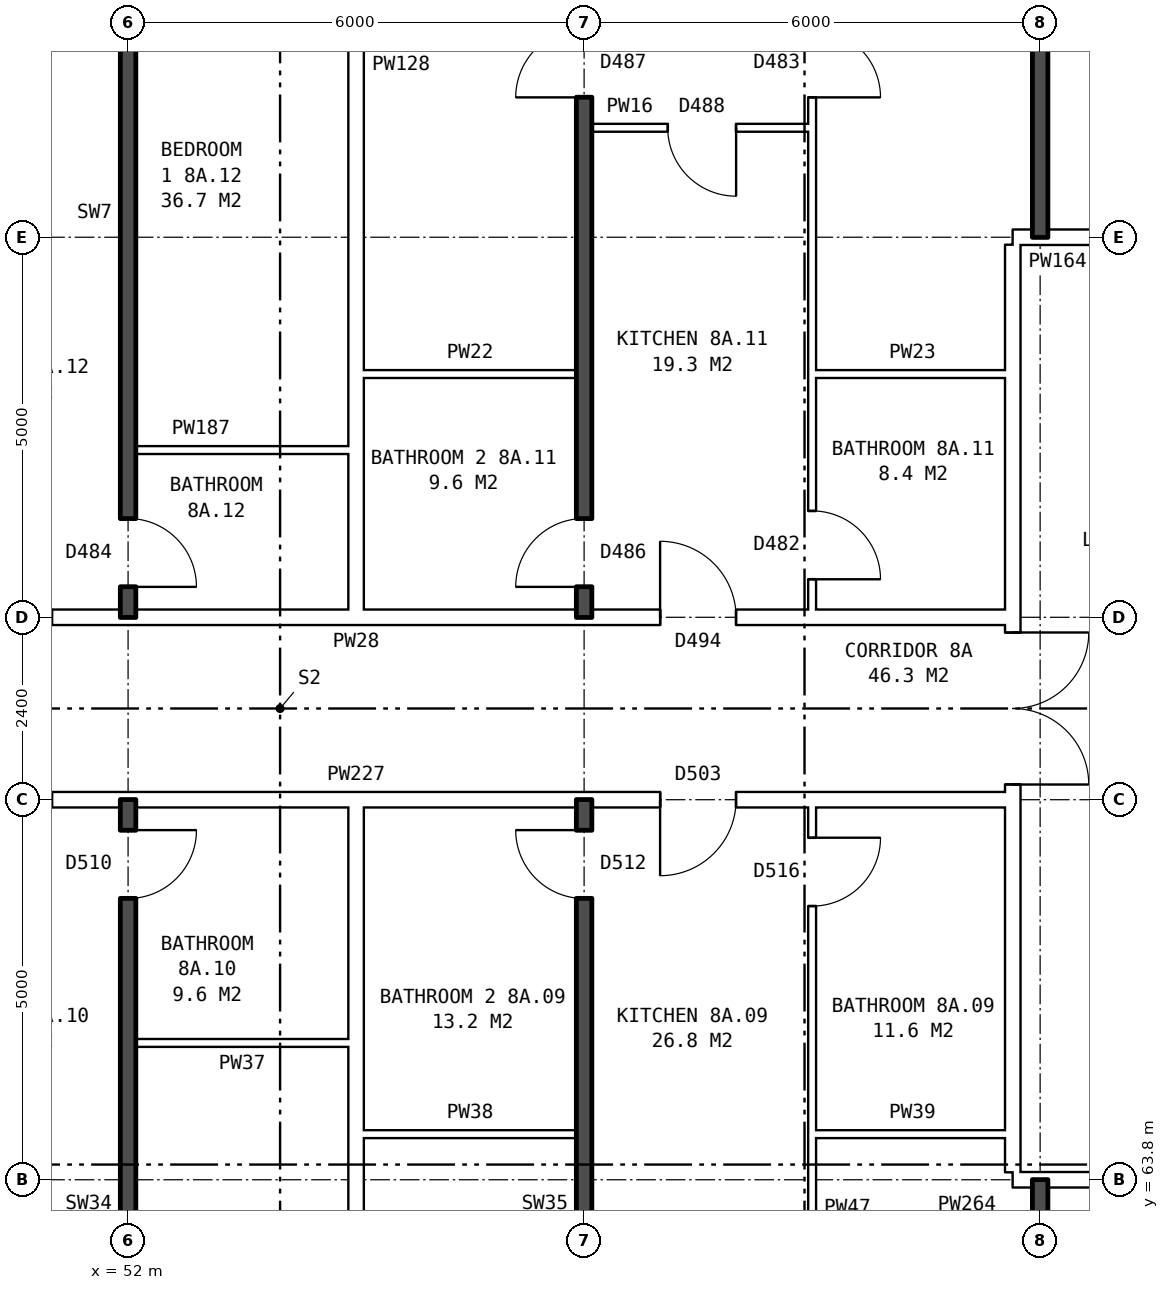
"""IFC4 building model, lengths in metres.
Left out: names, types, materials, properties, quantities, classifications, styles, units other than length and angle.
Written with IfcOpenShell. Run it as: python <this file> out.ifc"""

import sys

from ifc_helpers import new_model, si_unit, direction, frame, frame_2d, origin, place, context, subcontext, project, spatial, rectangle, extrude, element, fill, save


model = new_model("IFC4")
c1 = context("Model", 3, precision=1e-05, world=origin(), true_north=direction((0.0, 1.0)))
c2 = subcontext(c1, "Body", "Model", "MODEL_VIEW")
j1 = project(units=[si_unit("LENGTHUNIT", "METRE"), si_unit("PLANEANGLEUNIT", "RADIAN")], contexts=[c1])
p1 = place(None, origin())
s1 = spatial("IfcSite", under=j1, at=p1, CompositionType="ELEMENT")
p2 = place(p1, origin())
s2 = spatial("IfcBuilding", under=s1, at=p2, CompositionType="ELEMENT")
p3 = place(p2, frame((0.0, 0.0, 31.9)))
s3 = spatial("IfcBuildingStorey", under=s2, at=p3, CompositionType="ELEMENT", Elevation=31.9)
p4 = place(p3, frame((63.64, 63.9, 0.0), z_axis=(0.0, 0.0, 1.0), x_axis=(0.0, 1.0, 0.0)))
e1 = element("IfcWall", 1, at=p4, inside=s3, PredefinedType="PARTITIONING", context=c2, shape_type="SweptSolid", body=[
    extrude(rectangle(XDim=12.2, YDim=0.2, at=frame_2d((6.1, 0.0))), origin(), (0.0, 0.0, 1.0), 2.85),
])
p5 = place(p4, frame((5.1, 0.0, 0.0)))
e2 = element("IfcOpeningElement", 2, at=p5, cuts=e1, PredefinedType="OPENING", context=c2, shape_type="SweptSolid", body=[
    extrude(rectangle(XDim=2.0, YDim=2.1, at=frame_2d((1.0, 1.05))), frame((0.0, 0.11, 0.0), z_axis=(0.0, -1.0, 0.0), x_axis=(1.0, 0.0, 0.0)), (0.0, 0.0, 1.0), 0.22),
])
p6 = place(p3, frame((63.64, 63.8, 0.0), z_axis=(0.0, 0.0, 1.0), x_axis=(1.0, 0.0, 0.0)))
e3 = element("IfcWall", 3, at=p6, inside=s3, PredefinedType="PARTITIONING", context=c2, shape_type="SweptSolid", body=[
    extrude(rectangle(XDim=3.0, YDim=0.2, at=frame_2d((1.5, 0.0))), origin(), (0.0, 0.0, 1.0), 2.85),
])
p7 = place(p6, frame((1.18, 0.0, 0.0)))
e4 = element("IfcOpeningElement", 4, at=p7, cuts=e3, PredefinedType="OPENING", context=c2, shape_type="SweptSolid", body=[
    extrude(rectangle(XDim=1.0, YDim=2.1, at=frame_2d((0.5, 1.05))), frame((0.0, 0.11, 0.0), z_axis=(0.0, -1.0, 0.0), x_axis=(1.0, 0.0, 0.0)), (0.0, 0.0, 1.0), 0.22),
])
p8 = place(p3, frame((55.1, 64.4, 0.0), z_axis=(0.0, 0.0, 1.0), x_axis=(1.0, 0.0, 0.0)))
e5 = element("IfcWall", 5, at=p8, inside=s3, PredefinedType="PARTITIONING", context=c2, shape_type="SweptSolid", body=[
    extrude(rectangle(XDim=2.8, YDim=0.1, at=frame_2d((1.4, 0.0))), origin(), (0.0, 0.0, 1.0), 2.85),
])
p9 = place(p3, frame((61.0, 64.4, 0.0), z_axis=(0.0, 0.0, 1.0), x_axis=(1.0, 0.0, 0.0)))
e6 = element("IfcWall", 6, at=p9, inside=s3, PredefinedType="PARTITIONING", context=c2, shape_type="SweptSolid", body=[
    extrude(rectangle(XDim=2.64, YDim=0.1, at=frame_2d((1.32, 0.0))), origin(), (0.0, 0.0, 1.0), 2.85),
])
p10 = place(p3, frame((52.1, 65.6, 0.0), z_axis=(0.0, 0.0, 1.0), x_axis=(1.0, 0.0, 0.0)))
e7 = element("IfcWall", 7, at=p10, inside=s3, PredefinedType="PARTITIONING", context=c2, shape_type="SweptSolid", body=[
    extrude(rectangle(XDim=2.8, YDim=0.1, at=frame_2d((1.4, 0.0))), origin(), (0.0, 0.0, 1.0), 2.85),
])
p11 = place(p3, frame((44.36, 68.8, 0.0), z_axis=(0.0, 0.0, 1.0), x_axis=(1.0, 0.0, 0.0)))
e8 = element("IfcWall", 8, at=p11, inside=s3, PredefinedType="PARTITIONING", context=c2, shape_type="SweptSolid", body=[
    extrude(rectangle(XDim=19.28, YDim=0.2, at=frame_2d((9.64, 0.0))), origin(), (0.0, 0.0, 1.0), 2.85),
])
p12 = place(p11, frame((14.64, 0.0, 0.0)))
e9 = element("IfcOpeningElement", 9, at=p12, cuts=e8, PredefinedType="OPENING", context=c2, shape_type="SweptSolid", body=[
    extrude(rectangle(XDim=1.0, YDim=2.1, at=frame_2d((0.5, 1.05))), frame((0.0, 0.11, 0.0), z_axis=(0.0, -1.0, 0.0), x_axis=(1.0, 0.0, 0.0)), (0.0, 0.0, 1.0), 0.22),
])
p13 = place(p11, frame((5.64, 0.0, 0.0)))
e10 = element("IfcOpeningElement", 10, at=p13, cuts=e8, PredefinedType="OPENING", context=c2, shape_type="SweptSolid", body=[
    extrude(rectangle(XDim=1.0, YDim=2.1, at=frame_2d((0.5, 1.05))), frame((0.0, 0.11, 0.0), z_axis=(0.0, -1.0, 0.0), x_axis=(1.0, 0.0, 0.0)), (0.0, 0.0, 1.0), 0.22),
])
p14 = place(p3, frame((44.36, 71.2, 0.0), z_axis=(0.0, 0.0, 1.0), x_axis=(1.0, 0.0, 0.0)))
e11 = element("IfcWall", 11, at=p14, inside=s3, PredefinedType="PARTITIONING", context=c2, shape_type="SweptSolid", body=[
    extrude(rectangle(XDim=19.28, YDim=0.2, at=frame_2d((9.64, 0.0))), origin(), (0.0, 0.0, 1.0), 2.85),
])
p15 = place(p14, frame((14.64, 0.0, 0.0)))
e12 = element("IfcOpeningElement", 12, at=p15, cuts=e11, PredefinedType="OPENING", context=c2, shape_type="SweptSolid", body=[
    extrude(rectangle(XDim=1.0, YDim=2.1, at=frame_2d((0.5, 1.05))), frame((0.0, 0.11, 0.0), z_axis=(0.0, -1.0, 0.0), x_axis=(1.0, 0.0, 0.0)), (0.0, 0.0, 1.0), 0.22),
])
p16 = place(p14, frame((5.64, 0.0, 0.0)))
e13 = element("IfcOpeningElement", 13, at=p16, cuts=e11, PredefinedType="OPENING", context=c2, shape_type="SweptSolid", body=[
    extrude(rectangle(XDim=1.0, YDim=2.1, at=frame_2d((0.5, 1.05))), frame((0.0, 0.11, 0.0), z_axis=(0.0, -1.0, 0.0), x_axis=(1.0, 0.0, 0.0)), (0.0, 0.0, 1.0), 0.22),
])
for number, where, z_axis, x_axis in (
    (14, (52.1, 73.4, 0.0), (0.0, 0.0, 1.0), (1.0, 0.0, 0.0)),
    (15, (55.1, 74.4, 0.0), (0.0, 0.0, 1.0), (1.0, 0.0, 0.0)),
):
    element("IfcWall", number, at=place(p3, frame(where, z_axis=z_axis, x_axis=x_axis)), inside=s3, PredefinedType="PARTITIONING", context=c2, shape_type="SweptSolid", body=[
        extrude(rectangle(XDim=2.8, YDim=0.1, at=frame_2d((1.4, 0.0))), origin(), (0.0, 0.0, 1.0), 2.85),
    ])
p17 = place(p3, frame((61.0, 74.4, 0.0), z_axis=(0.0, 0.0, 1.0), x_axis=(1.0, 0.0, 0.0)))
e16 = element("IfcWall", 16, at=p17, inside=s3, PredefinedType="PARTITIONING", context=c2, shape_type="SweptSolid", body=[
    extrude(rectangle(XDim=2.64, YDim=0.1, at=frame_2d((1.32, 0.0))), origin(), (0.0, 0.0, 1.0), 2.85),
])
p18 = place(p3, frame((63.64, 76.2, 0.0), z_axis=(0.0, 0.0, 1.0), x_axis=(1.0, 0.0, 0.0)))
e17 = element("IfcWall", 17, at=p18, inside=s3, PredefinedType="PARTITIONING", context=c2, shape_type="SweptSolid", body=[
    extrude(rectangle(XDim=3.0, YDim=0.2, at=frame_2d((1.5, 0.0))), origin(), (0.0, 0.0, 1.0), 2.85),
])
p19 = place(p18, frame((1.18, 0.0, 0.0)))
e18 = element("IfcOpeningElement", 18, at=p19, cuts=e17, PredefinedType="OPENING", context=c2, shape_type="SweptSolid", body=[
    extrude(rectangle(XDim=1.0, YDim=2.1, at=frame_2d((0.5, 1.05))), frame((0.0, 0.11, 0.0), z_axis=(0.0, -1.0, 0.0), x_axis=(1.0, 0.0, 0.0)), (0.0, 0.0, 1.0), 0.22),
])
p20 = place(p3, frame((58.1, 77.64, 0.0), z_axis=(0.0, 0.0, 1.0), x_axis=(1.0, 0.0, 0.0)))
e19 = element("IfcWall", 19, at=p20, inside=s3, PredefinedType="PARTITIONING", context=c2, shape_type="SweptSolid", body=[
    extrude(rectangle(XDim=2.9, YDim=0.1, at=frame_2d((1.45, 0.0))), origin(), (0.0, 0.0, 1.0), 2.85),
])
p21 = place(p20, frame((1.0, 0.0, 0.0)))
e20 = element("IfcOpeningElement", 20, at=p21, cuts=e19, PredefinedType="OPENING", context=c2, shape_type="SweptSolid", body=[
    extrude(rectangle(XDim=0.9, YDim=2.1, at=frame_2d((0.45, 1.05))), frame((0.0, 0.06, 0.0), z_axis=(0.0, -1.0, 0.0), x_axis=(1.0, 0.0, 0.0)), (0.0, 0.0, 1.0), 0.12),
])
p22 = place(p3, frame((52.0, 54.36, 0.0), z_axis=(0.0, 0.0, 1.0), x_axis=(0.0, 1.0, 0.0)))
e21 = element("IfcWall", 21, at=p22, inside=s3, PredefinedType="SOLIDWALL", context=c2, shape_type="SweptSolid", body=[
    extrude(rectangle(XDim=14.44, YDim=0.2, at=frame_2d((7.22, 0.0))), origin(), (0.0, 0.0, 1.0), 2.85),
])
p23 = place(p22, frame((4.2, 0.0, 0.0)))
e22 = element("IfcOpeningElement", 22, at=p23, cuts=e21, PredefinedType="OPENING", context=c2, shape_type="SweptSolid", body=[
    extrude(rectangle(XDim=0.9, YDim=2.1, at=frame_2d((0.45, 1.05))), frame((0.0, 0.11, 0.0), z_axis=(0.0, -1.0, 0.0), x_axis=(1.0, 0.0, 0.0)), (0.0, 0.0, 1.0), 0.22),
])
p24 = place(p22, frame((13.14, 0.0, 0.0)))
e23 = element("IfcOpeningElement", 23, at=p24, cuts=e21, PredefinedType="OPENING", context=c2, shape_type="SweptSolid", body=[
    extrude(rectangle(XDim=0.9, YDim=2.1, at=frame_2d((0.45, 1.05))), frame((0.0, 0.11, 0.0), z_axis=(0.0, -1.0, 0.0), x_axis=(1.0, 0.0, 0.0)), (0.0, 0.0, 1.0), 0.22),
])
p25 = place(p3, frame((52.0, 71.2, 0.0), z_axis=(0.0, 0.0, 1.0), x_axis=(0.0, 1.0, 0.0)))
e24 = element("IfcWall", 24, at=p25, inside=s3, PredefinedType="SOLIDWALL", context=c2, shape_type="SweptSolid", body=[
    extrude(rectangle(XDim=14.44, YDim=0.2, at=frame_2d((7.22, 0.0))), origin(), (0.0, 0.0, 1.0), 2.85),
])
p26 = place(p25, frame((9.34, 0.0, 0.0)))
e25 = element("IfcOpeningElement", 25, at=p26, cuts=e24, PredefinedType="OPENING", context=c2, shape_type="SweptSolid", body=[
    extrude(rectangle(XDim=0.9, YDim=2.1, at=frame_2d((0.45, 1.05))), frame((0.0, 0.11, 0.0), z_axis=(0.0, -1.0, 0.0), x_axis=(1.0, 0.0, 0.0)), (0.0, 0.0, 1.0), 0.22),
])
p27 = place(p25, frame((0.4, 0.0, 0.0)))
e26 = element("IfcOpeningElement", 26, at=p27, cuts=e24, PredefinedType="OPENING", context=c2, shape_type="SweptSolid", body=[
    extrude(rectangle(XDim=0.9, YDim=2.1, at=frame_2d((0.45, 1.05))), frame((0.0, 0.11, 0.0), z_axis=(0.0, -1.0, 0.0), x_axis=(1.0, 0.0, 0.0)), (0.0, 0.0, 1.0), 0.22),
])
for number, where, z_axis, x_axis in (
    (27, (55.0, 54.36, 0.0), (0.0, 0.0, 1.0), (0.0, 1.0, 0.0)),
    (28, (55.0, 71.3, 0.0), (0.0, 0.0, 1.0), (0.0, 1.0, 0.0)),
):
    element("IfcWall", number, at=place(p3, frame(where, z_axis=z_axis, x_axis=x_axis)), inside=s3, PredefinedType="PARTITIONING", context=c2, shape_type="SweptSolid", body=[
        extrude(rectangle(XDim=14.34, YDim=0.2, at=frame_2d((7.17, 0.0))), origin(), (0.0, 0.0, 1.0), 2.85),
    ])
p28 = place(p3, frame((58.0, 54.36, 0.0), z_axis=(0.0, 0.0, 1.0), x_axis=(0.0, 1.0, 0.0)))
e29 = element("IfcWall", 29, at=p28, inside=s3, PredefinedType="SOLIDWALL", context=c2, shape_type="SweptSolid", body=[
    extrude(rectangle(XDim=14.44, YDim=0.2, at=frame_2d((7.22, 0.0))), origin(), (0.0, 0.0, 1.0), 2.85),
])
p29 = place(p28, frame((4.2, 0.0, 0.0)))
e30 = element("IfcOpeningElement", 30, at=p29, cuts=e29, PredefinedType="OPENING", context=c2, shape_type="SweptSolid", body=[
    extrude(rectangle(XDim=0.9, YDim=2.1, at=frame_2d((0.45, 1.05))), frame((0.0, 0.11, 0.0), z_axis=(0.0, -1.0, 0.0), x_axis=(1.0, 0.0, 0.0)), (0.0, 0.0, 1.0), 0.22),
])
p30 = place(p28, frame((13.14, 0.0, 0.0)))
e31 = element("IfcOpeningElement", 31, at=p30, cuts=e29, PredefinedType="OPENING", context=c2, shape_type="SweptSolid", body=[
    extrude(rectangle(XDim=0.9, YDim=2.1, at=frame_2d((0.45, 1.05))), frame((0.0, 0.11, 0.0), z_axis=(0.0, -1.0, 0.0), x_axis=(1.0, 0.0, 0.0)), (0.0, 0.0, 1.0), 0.22),
])
p31 = place(p3, frame((58.0, 71.2, 0.0), z_axis=(0.0, 0.0, 1.0), x_axis=(0.0, 1.0, 0.0)))
e32 = element("IfcWall", 32, at=p31, inside=s3, PredefinedType="SOLIDWALL", context=c2, shape_type="SweptSolid", body=[
    extrude(rectangle(XDim=14.44, YDim=0.2, at=frame_2d((7.22, 0.0))), origin(), (0.0, 0.0, 1.0), 2.85),
])
p32 = place(p31, frame((6.84, 0.0, 0.0)))
e33 = element("IfcOpeningElement", 33, at=p32, cuts=e32, PredefinedType="OPENING", context=c2, shape_type="SweptSolid", body=[
    extrude(rectangle(XDim=0.9, YDim=2.1, at=frame_2d((0.45, 1.05))), frame((0.0, 0.11, 0.0), z_axis=(0.0, -1.0, 0.0), x_axis=(1.0, 0.0, 0.0)), (0.0, 0.0, 1.0), 0.22),
])
p33 = place(p31, frame((0.4, 0.0, 0.0)))
e34 = element("IfcOpeningElement", 34, at=p33, cuts=e32, PredefinedType="OPENING", context=c2, shape_type="SweptSolid", body=[
    extrude(rectangle(XDim=0.9, YDim=2.1, at=frame_2d((0.45, 1.05))), frame((0.0, 0.11, 0.0), z_axis=(0.0, -1.0, 0.0), x_axis=(1.0, 0.0, 0.0)), (0.0, 0.0, 1.0), 0.22),
])
p34 = place(p3, frame((61.0, 54.36, 0.0), z_axis=(0.0, 0.0, 1.0), x_axis=(0.0, 1.0, 0.0)))
e35 = element("IfcWall", 35, at=p34, inside=s3, PredefinedType="PARTITIONING", context=c2, shape_type="SweptSolid", body=[
    extrude(rectangle(XDim=14.34, YDim=0.1, at=frame_2d((7.17, 0.0))), origin(), (0.0, 0.0, 1.0), 2.85),
])
p35 = place(p34, frame((4.2, 0.0, 0.0)))
e36 = element("IfcOpeningElement", 36, at=p35, cuts=e35, PredefinedType="OPENING", context=c2, shape_type="SweptSolid", body=[
    extrude(rectangle(XDim=0.9, YDim=2.1, at=frame_2d((0.45, 1.05))), frame((0.0, 0.06, 0.0), z_axis=(0.0, -1.0, 0.0), x_axis=(1.0, 0.0, 0.0)), (0.0, 0.0, 1.0), 0.12),
])
p36 = place(p34, frame((13.04, 0.0, 0.0)))
e37 = element("IfcOpeningElement", 37, at=p36, cuts=e35, PredefinedType="OPENING", context=c2, shape_type="SweptSolid", body=[
    extrude(rectangle(XDim=0.9, YDim=2.1, at=frame_2d((0.45, 1.05))), frame((0.0, 0.06, 0.0), z_axis=(0.0, -1.0, 0.0), x_axis=(1.0, 0.0, 0.0)), (0.0, 0.0, 1.0), 0.12),
])
p37 = place(p3, frame((61.0, 71.3, 0.0), z_axis=(0.0, 0.0, 1.0), x_axis=(0.0, 1.0, 0.0)))
e38 = element("IfcWall", 38, at=p37, inside=s3, PredefinedType="PARTITIONING", context=c2, shape_type="SweptSolid", body=[
    extrude(rectangle(XDim=14.34, YDim=0.1, at=frame_2d((7.17, 0.0))), origin(), (0.0, 0.0, 1.0), 2.85),
])
p38 = place(p37, frame((6.74, 0.0, 0.0)))
e39 = element("IfcOpeningElement", 39, at=p38, cuts=e38, PredefinedType="OPENING", context=c2, shape_type="SweptSolid", body=[
    extrude(rectangle(XDim=0.9, YDim=2.1, at=frame_2d((0.45, 1.05))), frame((0.0, 0.06, 0.0), z_axis=(0.0, -1.0, 0.0), x_axis=(1.0, 0.0, 0.0)), (0.0, 0.0, 1.0), 0.12),
])
p39 = place(p37, frame((0.4, 0.0, 0.0)))
e40 = element("IfcOpeningElement", 40, at=p39, cuts=e38, PredefinedType="OPENING", context=c2, shape_type="SweptSolid", body=[
    extrude(rectangle(XDim=0.9, YDim=2.1, at=frame_2d((0.45, 1.05))), frame((0.0, 0.06, 0.0), z_axis=(0.0, -1.0, 0.0), x_axis=(1.0, 0.0, 0.0)), (0.0, 0.0, 1.0), 0.12),
])
for number, where, z_axis, x_axis in (
    (41, (64.0, 54.36, 0.0), (0.0, 0.0, 1.0), (0.0, 1.0, 0.0)),
    (42, (64.0, 76.2, 0.0), (0.0, 0.0, 1.0), (0.0, 1.0, 0.0)),
):
    element("IfcWall", number, at=place(p3, frame(where, z_axis=z_axis, x_axis=x_axis)), inside=s3, PredefinedType="SOLIDWALL", context=c2, shape_type="SweptSolid", body=[
        extrude(rectangle(XDim=9.44, YDim=0.2, at=frame_2d((4.72, 0.0))), origin(), (0.0, 0.0, 1.0), 2.85),
    ])
p40 = place(p5, frame((2.0, 0.0, 0.0), z_axis=(0.0, 0.0, 1.0), x_axis=(-1.0, 0.0, 0.0)))
e43 = element("IfcDoor", 43, at=p40, inside=s3, OperationType="DOUBLE_DOOR_SINGLE_SWING", PredefinedType="DOOR", context=c2, shape_type="SweptSolid", body=[
    extrude(rectangle(XDim=2.0, YDim=2.1, at=frame_2d((1.0, 1.05))), frame((0.0, 0.025, 0.0), z_axis=(0.0, -1.0, 0.0), x_axis=(1.0, 0.0, 0.0)), (0.0, 0.0, 1.0), 0.05),
])
fill(e2, e43)
p41 = place(p12, frame((1.0, 0.0, 0.0), z_axis=(0.0, 0.0, 1.0), x_axis=(-1.0, 0.0, 0.0)))
e44 = element("IfcDoor", 44, at=p41, inside=s3, OperationType="SINGLE_SWING_RIGHT", PredefinedType="DOOR", context=c2, shape_type="SweptSolid", body=[
    extrude(rectangle(XDim=1.0, YDim=2.1, at=frame_2d((0.5, 1.05))), frame((0.0, 0.025, 0.0), z_axis=(0.0, -1.0, 0.0), x_axis=(1.0, 0.0, 0.0)), (0.0, 0.0, 1.0), 0.05),
])
fill(e9, e44)
p42 = place(p36, frame((0.9, 0.0, 0.0), z_axis=(0.0, 0.0, 1.0), x_axis=(-1.0, 0.0, 0.0)))
e45 = element("IfcDoor", 45, at=p42, inside=s3, OperationType="SINGLE_SWING_LEFT", PredefinedType="DOOR", context=c2, shape_type="SweptSolid", body=[
    extrude(rectangle(XDim=0.9, YDim=2.1, at=frame_2d((0.45, 1.05))), frame((0.0, 0.025, 0.0), z_axis=(0.0, -1.0, 0.0), x_axis=(1.0, 0.0, 0.0)), (0.0, 0.0, 1.0), 0.05),
])
fill(e37, e45)
p43 = place(p30, origin())
e46 = element("IfcDoor", 46, at=p43, inside=s3, OperationType="SINGLE_SWING_RIGHT", PredefinedType="DOOR", context=c2, shape_type="SweptSolid", body=[
    extrude(rectangle(XDim=0.9, YDim=2.1, at=frame_2d((0.45, 1.05))), frame((0.0, 0.025, 0.0), z_axis=(0.0, -1.0, 0.0), x_axis=(1.0, 0.0, 0.0)), (0.0, 0.0, 1.0), 0.05),
])
fill(e31, e46)
p44 = place(p24, frame((0.9, 0.0, 0.0), z_axis=(0.0, 0.0, 1.0), x_axis=(-1.0, 0.0, 0.0)))
e47 = element("IfcDoor", 47, at=p44, inside=s3, OperationType="SINGLE_SWING_LEFT", PredefinedType="DOOR", context=c2, shape_type="SweptSolid", body=[
    extrude(rectangle(XDim=0.9, YDim=2.1, at=frame_2d((0.45, 1.05))), frame((0.0, 0.025, 0.0), z_axis=(0.0, -1.0, 0.0), x_axis=(1.0, 0.0, 0.0)), (0.0, 0.0, 1.0), 0.05),
])
fill(e23, e47)
p45 = place(p38, frame((0.9, 0.0, 0.0), z_axis=(0.0, 0.0, 1.0), x_axis=(-1.0, 0.0, 0.0)))
e48 = element("IfcDoor", 48, at=p45, inside=s3, OperationType="SINGLE_SWING_RIGHT", PredefinedType="DOOR", context=c2, shape_type="SweptSolid", body=[
    extrude(rectangle(XDim=0.9, YDim=2.1, at=frame_2d((0.45, 1.05))), frame((0.0, 0.025, 0.0), z_axis=(0.0, -1.0, 0.0), x_axis=(1.0, 0.0, 0.0)), (0.0, 0.0, 1.0), 0.05),
])
fill(e39, e48)
p46 = place(p32, origin())
e49 = element("IfcDoor", 49, at=p46, inside=s3, OperationType="SINGLE_SWING_LEFT", PredefinedType="DOOR", context=c2, shape_type="SweptSolid", body=[
    extrude(rectangle(XDim=0.9, YDim=2.1, at=frame_2d((0.45, 1.05))), frame((0.0, 0.025, 0.0), z_axis=(0.0, -1.0, 0.0), x_axis=(1.0, 0.0, 0.0)), (0.0, 0.0, 1.0), 0.05),
])
fill(e33, e49)
p47 = place(p15, origin())
e50 = element("IfcDoor", 50, at=p47, inside=s3, OperationType="SINGLE_SWING_LEFT", PredefinedType="DOOR", context=c2, shape_type="SweptSolid", body=[
    extrude(rectangle(XDim=1.0, YDim=2.1, at=frame_2d((0.5, 1.05))), frame((0.0, 0.025, 0.0), z_axis=(0.0, -1.0, 0.0), x_axis=(1.0, 0.0, 0.0)), (0.0, 0.0, 1.0), 0.05),
])
fill(e12, e50)
p48 = place(p21, frame((0.9, 0.0, 0.0), z_axis=(0.0, 0.0, 1.0), x_axis=(-1.0, 0.0, 0.0)))
e51 = element("IfcDoor", 51, at=p48, inside=s3, OperationType="SINGLE_SWING_LEFT", PredefinedType="DOOR", context=c2, shape_type="SweptSolid", body=[
    extrude(rectangle(XDim=0.9, YDim=2.1, at=frame_2d((0.45, 1.05))), frame((0.0, 0.025, 0.0), z_axis=(0.0, -1.0, 0.0), x_axis=(1.0, 0.0, 0.0)), (0.0, 0.0, 1.0), 0.05),
])
fill(e20, e51)
p49 = place(p39, frame((0.9, 0.0, 0.0), z_axis=(0.0, 0.0, 1.0), x_axis=(-1.0, 0.0, 0.0)))
e52 = element("IfcDoor", 52, at=p49, inside=s3, OperationType="SINGLE_SWING_RIGHT", PredefinedType="DOOR", context=c2, shape_type="SweptSolid", body=[
    extrude(rectangle(XDim=0.9, YDim=2.1, at=frame_2d((0.45, 1.05))), frame((0.0, 0.025, 0.0), z_axis=(0.0, -1.0, 0.0), x_axis=(1.0, 0.0, 0.0)), (0.0, 0.0, 1.0), 0.05),
])
fill(e40, e52)
p50 = place(p33, origin())
e53 = element("IfcDoor", 53, at=p50, inside=s3, OperationType="SINGLE_SWING_LEFT", PredefinedType="DOOR", context=c2, shape_type="SweptSolid", body=[
    extrude(rectangle(XDim=0.9, YDim=2.1, at=frame_2d((0.45, 1.05))), frame((0.0, 0.025, 0.0), z_axis=(0.0, -1.0, 0.0), x_axis=(1.0, 0.0, 0.0)), (0.0, 0.0, 1.0), 0.05),
])
fill(e34, e53)
p51 = place(p27, frame((0.9, 0.0, 0.0), z_axis=(0.0, 0.0, 1.0), x_axis=(-1.0, 0.0, 0.0)))
e54 = element("IfcDoor", 54, at=p51, inside=s3, OperationType="SINGLE_SWING_RIGHT", PredefinedType="DOOR", context=c2, shape_type="SweptSolid", body=[
    extrude(rectangle(XDim=0.9, YDim=2.1, at=frame_2d((0.45, 1.05))), frame((0.0, 0.025, 0.0), z_axis=(0.0, -1.0, 0.0), x_axis=(1.0, 0.0, 0.0)), (0.0, 0.0, 1.0), 0.05),
])
fill(e26, e54)
save(model, sys.argv[1])
